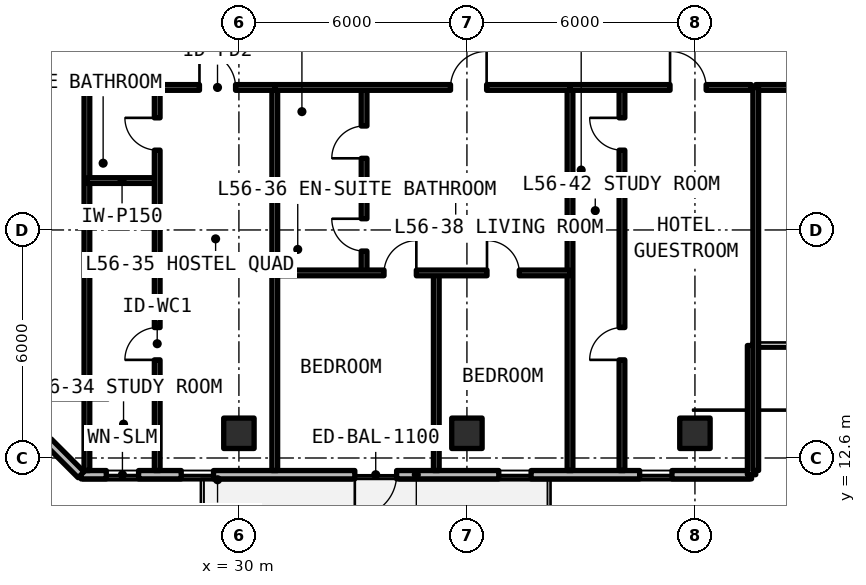
"""IFC4 building model, lengths in metres.
Left out: names, types, materials, properties, quantities, classifications, styles, units other than length and angle.
Written with IfcOpenShell. Run it as: python <this file> out.ifc"""

import sys

from ifc_helpers import new_model, si_unit, direction, frame, frame_2d, origin, origin_2d, place, context, subcontext, project, spatial, rectangle, extrude, element, fill, save


model = new_model("IFC4")
c1 = context("Model", 3, precision=1e-05, world=origin(), true_north=direction((0.0, 1.0)))
c2 = subcontext(c1, "Body", "Model", "MODEL_VIEW")
j1 = project(units=[si_unit("LENGTHUNIT", "METRE"), si_unit("PLANEANGLEUNIT", "RADIAN")], contexts=[c1])
p1 = place(None, origin())
s1 = spatial("IfcSite", under=j1, at=p1, CompositionType="ELEMENT")
p2 = place(p1, origin())
s2 = spatial("IfcBuilding", under=s1, at=p2, CompositionType="ELEMENT")
p3 = place(p2, frame((0.0, 0.0, 201.63)))
s3 = spatial("IfcBuildingStorey", under=s2, at=p3, CompositionType="ELEMENT", Elevation=201.63)
for number, where, z_axis, x_axis in (
    (1, (30.0, 13.25, 0.0), (0.0, 0.0, 1.0), (1.0, 0.0, 0.0)),
    (2, (36.0, 13.25, 0.0), (0.0, 0.0, 1.0), (1.0, 0.0, 0.0)),
    (3, (42.0, 13.25, 0.0), (0.0, 0.0, 1.0), (1.0, 0.0, 0.0)),
):
    element("IfcColumn", number, at=place(p3, frame(where, z_axis=z_axis, x_axis=x_axis)), inside=s3, PredefinedType="COLUMN", context=c2, shape_type="SweptSolid", body=[
        extrude(rectangle(XDim=0.8, YDim=0.8, at=origin_2d()), origin(), (0.0, 0.0, 1.0), 3.3),
    ])
p4 = place(p3, frame((25.846, 12.16, 0.0), z_axis=(0.0, 0.0, 1.0), x_axis=(1.0, 0.0, 0.0)))
e4 = element("IfcWall", 4, at=p4, inside=s3, PredefinedType="SOLIDWALL", context=c2, shape_type="SweptSolid", body=[
    extrude(rectangle(XDim=17.644, YDim=0.22, at=frame_2d((8.822, 0.0))), origin(), (0.0, 0.0, 1.0), 3.08),
])
p5 = place(p4, frame((7.204, 0.0, 0.0)))
e5 = element("IfcOpeningElement", 5, at=p5, cuts=e4, PredefinedType="OPENING", context=c2, shape_type="SweptSolid", body=[
    extrude(rectangle(XDim=1.1, YDim=2.15, at=frame_2d((0.55, 1.075))), frame((0.0, 0.12, 0.0), z_axis=(0.0, -1.0, 0.0), x_axis=(1.0, 0.0, 0.0)), (0.0, 0.0, 1.0), 0.24),
])
p6 = place(p4, frame((0.664, 0.0, 0.78)))
e6 = element("IfcOpeningElement", 6, at=p6, cuts=e4, PredefinedType="OPENING", context=c2, shape_type="SweptSolid", body=[
    extrude(rectangle(XDim=0.85, YDim=1.65, at=frame_2d((0.425, 0.825))), frame((0.0, 0.12, 0.0), z_axis=(0.0, -1.0, 0.0), x_axis=(1.0, 0.0, 0.0)), (0.0, 0.0, 1.0), 0.24),
])
p7 = place(p4, frame((2.636, 0.0, 0.78)))
e7 = element("IfcOpeningElement", 7, at=p7, cuts=e4, PredefinedType="OPENING", context=c2, shape_type="SweptSolid", body=[
    extrude(rectangle(XDim=0.85, YDim=1.65, at=frame_2d((0.425, 0.825))), frame((0.0, 0.12, 0.0), z_axis=(0.0, -1.0, 0.0), x_axis=(1.0, 0.0, 0.0)), (0.0, 0.0, 1.0), 0.24),
])
p8 = place(p4, frame((10.993, 0.0, 0.78)))
e8 = element("IfcOpeningElement", 8, at=p8, cuts=e4, PredefinedType="OPENING", context=c2, shape_type="SweptSolid", body=[
    extrude(rectangle(XDim=0.85, YDim=1.65, at=frame_2d((0.425, 0.825))), frame((0.0, 0.12, 0.0), z_axis=(0.0, -1.0, 0.0), x_axis=(1.0, 0.0, 0.0)), (0.0, 0.0, 1.0), 0.24),
])
p9 = place(p4, frame((14.699, 0.0, 0.78)))
e9 = element("IfcOpeningElement", 9, at=p9, cuts=e4, PredefinedType="OPENING", context=c2, shape_type="SweptSolid", body=[
    extrude(rectangle(XDim=0.85, YDim=1.65, at=frame_2d((0.425, 0.825))), frame((0.0, 0.12, 0.0), z_axis=(0.0, -1.0, 0.0), x_axis=(1.0, 0.0, 0.0)), (0.0, 0.0, 1.0), 0.24),
])
p10 = place(p3, frame((43.49, 12.16, 0.0), z_axis=(0.0, 0.0, 1.0), x_axis=(0.0, 1.0, 0.0)))
e10 = element("IfcWall", 10, at=p10, inside=s3, PredefinedType="SOLIDWALL", context=c2, shape_type="SweptSolid", body=[
    extrude(rectangle(XDim=3.4, YDim=0.22, at=frame_2d((1.7, 0.0))), origin(), (0.0, 0.0, 1.0), 3.08),
])
p11 = place(p3, frame((21.71, 16.296, 0.0), z_axis=(0.0, 0.0, 1.0), x_axis=(0.707106781187, -0.707106781187, 0.0)))
e11 = element("IfcWall", 11, at=p11, inside=s3, PredefinedType="SOLIDWALL", context=c2, shape_type="SweptSolid", body=[
    extrude(rectangle(XDim=5.849, YDim=0.22, at=frame_2d((2.924, 0.0))), origin(), (0.0, 0.0, 1.0), 3.08),
])
p12 = place(p11, frame((1.224, 0.0, 0.78)))
e12 = element("IfcOpeningElement", 12, at=p12, cuts=e11, PredefinedType="OPENING", context=c2, shape_type="SweptSolid", body=[
    extrude(rectangle(XDim=3.4, YDim=1.66, at=frame_2d((1.7, 0.83))), frame((0.0, 0.12, 0.0), z_axis=(0.0, -1.0, 0.0), x_axis=(1.0, 0.0, 0.0)), (0.0, 0.0, 1.0), 0.24),
])
p13 = place(p3, frame((43.6, 22.35, 0.0), z_axis=(0.0, 0.0, 1.0), x_axis=(1.0, 0.0, 0.0)))
e13 = element("IfcWall", 13, at=p13, inside=s3, PredefinedType="SOLIDWALL", context=c2, shape_type="SweptSolid", body=[
    extrude(rectangle(XDim=8.4, YDim=0.15, at=frame_2d((4.2, 0.0))), origin(), (0.0, 0.0, 1.0), 2.35),
])
p14 = place(p13, frame((3.65, 0.0, 0.0)))
e14 = element("IfcOpeningElement", 14, at=p14, cuts=e13, PredefinedType="OPENING", context=c2, shape_type="SweptSolid", body=[
    extrude(rectangle(XDim=1.1, YDim=2.15, at=frame_2d((0.55, 1.075))), frame((0.0, 0.085, 0.0), z_axis=(0.0, -1.0, 0.0), x_axis=(1.0, 0.0, 0.0)), (0.0, 0.0, 1.0), 0.17),
])
for number, where, z_axis, x_axis in (
    (15, (43.6, 12.27, 0.0), (0.0, 0.0, 1.0), (0.0, 1.0, 0.0)),
    (16, (26.0, 12.27, 0.0), (0.0, 0.0, 1.0), (0.0, 1.0, 0.0)),
    (17, (30.944, 12.27, 0.0), (0.0, 0.0, 1.0), (0.0, 1.0, 0.0)),
):
    element("IfcWall", number, at=place(p3, frame(where, z_axis=z_axis, x_axis=x_axis)), inside=s3, PredefinedType="SOLIDWALL", context=c2, shape_type="SweptSolid", body=[
        extrude(rectangle(XDim=10.08, YDim=0.15, at=frame_2d((5.04, 0.0))), origin(), (0.0, 0.0, 1.0), 2.35),
    ])
p15 = place(p3, frame((26.0, 19.9, 0.0), z_axis=(0.0, 0.0, 1.0), x_axis=(1.0, 0.0, 0.0)))
e18 = element("IfcWall", 18, at=p15, inside=s3, PredefinedType="PARTITIONING", context=c2, shape_type="SweptSolid", body=[
    extrude(rectangle(XDim=1.85, YDim=0.15, at=frame_2d((0.925, 0.0))), origin(), (0.0, 0.0, 1.0), 2.35),
])
p16 = place(p3, frame((27.85, 12.27, 0.0), z_axis=(0.0, 0.0, 1.0), x_axis=(0.0, 1.0, 0.0)))
e19 = element("IfcWall", 19, at=p16, inside=s3, PredefinedType="PARTITIONING", context=c2, shape_type="SweptSolid", body=[
    extrude(rectangle(XDim=10.08, YDim=0.15, at=frame_2d((5.04, 0.0))), origin(), (0.0, 0.0, 1.0), 2.35),
])
p17 = place(p16, frame((2.912, 0.0, 0.0)))
e20 = element("IfcOpeningElement", 20, at=p17, cuts=e19, PredefinedType="OPENING", context=c2, shape_type="SweptSolid", body=[
    extrude(rectangle(XDim=0.85, YDim=2.1, at=frame_2d((0.425, 1.05))), frame((0.0, 0.085, 0.0), z_axis=(0.0, -1.0, 0.0), x_axis=(1.0, 0.0, 0.0)), (0.0, 0.0, 1.0), 0.17),
])
p18 = place(p16, frame((8.43, 0.0, 0.0)))
e21 = element("IfcOpeningElement", 21, at=p18, cuts=e19, PredefinedType="OPENING", context=c2, shape_type="SweptSolid", body=[
    extrude(rectangle(XDim=0.85, YDim=2.1, at=frame_2d((0.425, 1.05))), frame((0.0, 0.085, 0.0), z_axis=(0.0, -1.0, 0.0), x_axis=(1.0, 0.0, 0.0)), (0.0, 0.0, 1.0), 0.17),
])
p19 = place(p3, frame((26.0, 22.35, 0.0), z_axis=(0.0, 0.0, 1.0), x_axis=(1.0, 0.0, 0.0)))
e22 = element("IfcWall", 22, at=p19, inside=s3, PredefinedType="SOLIDWALL", context=c2, shape_type="SweptSolid", body=[
    extrude(rectangle(XDim=4.944, YDim=0.15, at=frame_2d((2.472, 0.0))), origin(), (0.0, 0.0, 1.0), 2.35),
])
p20 = place(p19, frame((2.962, 0.0, 0.0)))
e23 = element("IfcOpeningElement", 23, at=p20, cuts=e22, PredefinedType="OPENING", context=c2, shape_type="SweptSolid", body=[
    extrude(rectangle(XDim=0.95, YDim=2.15, at=frame_2d((0.475, 1.075))), frame((0.0, 0.085, 0.0), z_axis=(0.0, -1.0, 0.0), x_axis=(1.0, 0.0, 0.0)), (0.0, 0.0, 1.0), 0.17),
])
p21 = place(p3, frame((38.713, 12.27, 0.0), z_axis=(0.0, 0.0, 1.0), x_axis=(0.0, 1.0, 0.0)))
e24 = element("IfcWall", 24, at=p21, inside=s3, PredefinedType="SOLIDWALL", context=c2, shape_type="SweptSolid", body=[
    extrude(rectangle(XDim=10.08, YDim=0.15, at=frame_2d((5.04, 0.0))), origin(), (0.0, 0.0, 1.0), 2.35),
])
p22 = place(p3, frame((30.944, 19.471, 0.0), z_axis=(0.0, 0.0, 1.0), x_axis=(1.0, 0.0, 0.0)))
e25 = element("IfcWall", 25, at=p22, inside=s3, PredefinedType="PARTITIONING", context=c2, shape_type="SweptSolid", body=[
    extrude(rectangle(XDim=2.35, YDim=0.15, at=frame_2d((1.175, 0.0))), origin(), (0.0, 0.0, 1.0), 2.35),
])
p23 = place(p3, frame((33.294, 17.47, 0.0), z_axis=(0.0, 0.0, 1.0), x_axis=(0.0, 1.0, 0.0)))
e26 = element("IfcWall", 26, at=p23, inside=s3, PredefinedType="PARTITIONING", context=c2, shape_type="SweptSolid", body=[
    extrude(rectangle(XDim=4.88, YDim=0.15, at=frame_2d((2.44, 0.0))), origin(), (0.0, 0.0, 1.0), 2.35),
])
p24 = place(p23, frame((0.575, 0.0, 0.0)))
e27 = element("IfcOpeningElement", 27, at=p24, cuts=e26, PredefinedType="OPENING", context=c2, shape_type="SweptSolid", body=[
    extrude(rectangle(XDim=0.85, YDim=2.1, at=frame_2d((0.425, 1.05))), frame((0.0, 0.085, 0.0), z_axis=(0.0, -1.0, 0.0), x_axis=(1.0, 0.0, 0.0)), (0.0, 0.0, 1.0), 0.17),
])
p25 = place(p23, frame((3.015, 0.0, 0.0)))
e28 = element("IfcOpeningElement", 28, at=p25, cuts=e26, PredefinedType="OPENING", context=c2, shape_type="SweptSolid", body=[
    extrude(rectangle(XDim=0.85, YDim=2.1, at=frame_2d((0.425, 1.05))), frame((0.0, 0.085, 0.0), z_axis=(0.0, -1.0, 0.0), x_axis=(1.0, 0.0, 0.0)), (0.0, 0.0, 1.0), 0.17),
])
p26 = place(p3, frame((35.194, 12.27, 0.0), z_axis=(0.0, 0.0, 1.0), x_axis=(0.0, 1.0, 0.0)))
e29 = element("IfcWall", 29, at=p26, inside=s3, PredefinedType="PARTITIONING", context=c2, shape_type="SweptSolid", body=[
    extrude(rectangle(XDim=5.2, YDim=0.15, at=frame_2d((2.6, 0.0))), origin(), (0.0, 0.0, 1.0), 2.35),
])
p27 = place(p3, frame((30.944, 17.47, 0.0), z_axis=(0.0, 0.0, 1.0), x_axis=(1.0, 0.0, 0.0)))
e30 = element("IfcWall", 30, at=p27, inside=s3, PredefinedType="PARTITIONING", context=c2, shape_type="SweptSolid", body=[
    extrude(rectangle(XDim=7.769, YDim=0.15, at=frame_2d((3.884, 0.0))), origin(), (0.0, 0.0, 1.0), 2.35),
])
p28 = place(p27, frame((2.875, 0.0, 0.0)))
e31 = element("IfcOpeningElement", 31, at=p28, cuts=e30, PredefinedType="OPENING", context=c2, shape_type="SweptSolid", body=[
    extrude(rectangle(XDim=0.85, YDim=2.1, at=frame_2d((0.425, 1.05))), frame((0.0, 0.085, 0.0), z_axis=(0.0, -1.0, 0.0), x_axis=(1.0, 0.0, 0.0)), (0.0, 0.0, 1.0), 0.17),
])
p29 = place(p27, frame((5.584, 0.0, 0.0)))
e32 = element("IfcOpeningElement", 32, at=p29, cuts=e30, PredefinedType="OPENING", context=c2, shape_type="SweptSolid", body=[
    extrude(rectangle(XDim=0.85, YDim=2.1, at=frame_2d((0.425, 1.05))), frame((0.0, 0.085, 0.0), z_axis=(0.0, -1.0, 0.0), x_axis=(1.0, 0.0, 0.0)), (0.0, 0.0, 1.0), 0.17),
])
p30 = place(p3, frame((30.944, 22.35, 0.0), z_axis=(0.0, 0.0, 1.0), x_axis=(1.0, 0.0, 0.0)))
e33 = element("IfcWall", 33, at=p30, inside=s3, PredefinedType="SOLIDWALL", context=c2, shape_type="SweptSolid", body=[
    extrude(rectangle(XDim=7.769, YDim=0.15, at=frame_2d((3.884, 0.0))), origin(), (0.0, 0.0, 1.0), 2.35),
])
p31 = place(p30, frame((4.625, 0.0, 0.0)))
e34 = element("IfcOpeningElement", 34, at=p31, cuts=e33, PredefinedType="OPENING", context=c2, shape_type="SweptSolid", body=[
    extrude(rectangle(XDim=0.95, YDim=2.15, at=frame_2d((0.475, 1.075))), frame((0.0, 0.085, 0.0), z_axis=(0.0, -1.0, 0.0), x_axis=(1.0, 0.0, 0.0)), (0.0, 0.0, 1.0), 0.17),
])
p32 = place(p3, frame((38.713, 19.9, 0.0), z_axis=(0.0, 0.0, 1.0), x_axis=(1.0, 0.0, 0.0)))
e35 = element("IfcWall", 35, at=p32, inside=s3, PredefinedType="PARTITIONING", context=c2, shape_type="SweptSolid", body=[
    extrude(rectangle(XDim=1.367, YDim=0.15, at=frame_2d((0.684, 0.0))), origin(), (0.0, 0.0, 1.0), 2.35),
])
p33 = place(p3, frame((40.08, 12.27, 0.0), z_axis=(0.0, 0.0, 1.0), x_axis=(0.0, 1.0, 0.0)))
e36 = element("IfcWall", 36, at=p33, inside=s3, PredefinedType="PARTITIONING", context=c2, shape_type="SweptSolid", body=[
    extrude(rectangle(XDim=10.08, YDim=0.15, at=frame_2d((5.04, 0.0))), origin(), (0.0, 0.0, 1.0), 2.35),
])
p34 = place(p33, frame((2.912, 0.0, 0.0)))
e37 = element("IfcOpeningElement", 37, at=p34, cuts=e36, PredefinedType="OPENING", context=c2, shape_type="SweptSolid", body=[
    extrude(rectangle(XDim=0.85, YDim=2.1, at=frame_2d((0.425, 1.05))), frame((0.0, 0.085, 0.0), z_axis=(0.0, -1.0, 0.0), x_axis=(1.0, 0.0, 0.0)), (0.0, 0.0, 1.0), 0.17),
])
p35 = place(p33, frame((8.43, 0.0, 0.0)))
e38 = element("IfcOpeningElement", 38, at=p35, cuts=e36, PredefinedType="OPENING", context=c2, shape_type="SweptSolid", body=[
    extrude(rectangle(XDim=0.85, YDim=2.1, at=frame_2d((0.425, 1.05))), frame((0.0, 0.085, 0.0), z_axis=(0.0, -1.0, 0.0), x_axis=(1.0, 0.0, 0.0)), (0.0, 0.0, 1.0), 0.17),
])
p36 = place(p3, frame((38.713, 22.35, 0.0), z_axis=(0.0, 0.0, 1.0), x_axis=(1.0, 0.0, 0.0)))
e39 = element("IfcWall", 39, at=p36, inside=s3, PredefinedType="SOLIDWALL", context=c2, shape_type="SweptSolid", body=[
    extrude(rectangle(XDim=4.767, YDim=0.15, at=frame_2d((2.384, 0.0))), origin(), (0.0, 0.0, 1.0), 2.35),
])
p37 = place(p36, frame((2.632, 0.0, 0.0)))
e40 = element("IfcOpeningElement", 40, at=p37, cuts=e39, PredefinedType="OPENING", context=c2, shape_type="SweptSolid", body=[
    extrude(rectangle(XDim=0.95, YDim=2.15, at=frame_2d((0.475, 1.075))), frame((0.0, 0.085, 0.0), z_axis=(0.0, -1.0, 0.0), x_axis=(1.0, 0.0, 0.0)), (0.0, 0.0, 1.0), 0.17),
])
p38 = place(p5, frame((1.1, 0.0, 0.0), z_axis=(0.0, 0.0, 1.0), x_axis=(-1.0, 0.0, 0.0)))
e41 = element("IfcDoor", 41, at=p38, inside=s3, OperationType="SINGLE_SWING_LEFT", PredefinedType="DOOR", context=c2, shape_type="SweptSolid", body=[
    extrude(rectangle(XDim=1.1, YDim=2.15, at=frame_2d((0.55, 1.075))), frame((0.0, 0.025, 0.0), z_axis=(0.0, -1.0, 0.0), x_axis=(1.0, 0.0, 0.0)), (0.0, 0.0, 1.0), 0.05),
])
fill(e5, e41)
p39 = place(p6, origin())
e42 = element("IfcWindow", 42, at=p39, inside=s3, PartitioningType="SINGLE_PANEL", PredefinedType="WINDOW", context=c2, shape_type="SweptSolid", body=[
    extrude(rectangle(XDim=0.85, YDim=1.65, at=frame_2d((0.425, 0.825))), frame((0.0, 0.03, 0.0), z_axis=(0.0, -1.0, 0.0), x_axis=(1.0, 0.0, 0.0)), (0.0, 0.0, 1.0), 0.06),
])
fill(e6, e42)
p40 = place(p7, origin())
e43 = element("IfcWindow", 43, at=p40, inside=s3, PartitioningType="SINGLE_PANEL", PredefinedType="WINDOW", context=c2, shape_type="SweptSolid", body=[
    extrude(rectangle(XDim=0.85, YDim=1.65, at=frame_2d((0.425, 0.825))), frame((0.0, 0.03, 0.0), z_axis=(0.0, -1.0, 0.0), x_axis=(1.0, 0.0, 0.0)), (0.0, 0.0, 1.0), 0.06),
])
fill(e7, e43)
p41 = place(p8, origin())
e44 = element("IfcWindow", 44, at=p41, inside=s3, PartitioningType="SINGLE_PANEL", PredefinedType="WINDOW", context=c2, shape_type="SweptSolid", body=[
    extrude(rectangle(XDim=0.85, YDim=1.65, at=frame_2d((0.425, 0.825))), frame((0.0, 0.03, 0.0), z_axis=(0.0, -1.0, 0.0), x_axis=(1.0, 0.0, 0.0)), (0.0, 0.0, 1.0), 0.06),
])
fill(e8, e44)
p42 = place(p9, origin())
e45 = element("IfcWindow", 45, at=p42, inside=s3, PartitioningType="SINGLE_PANEL", PredefinedType="WINDOW", context=c2, shape_type="SweptSolid", body=[
    extrude(rectangle(XDim=0.85, YDim=1.65, at=frame_2d((0.425, 0.825))), frame((0.0, 0.03, 0.0), z_axis=(0.0, -1.0, 0.0), x_axis=(1.0, 0.0, 0.0)), (0.0, 0.0, 1.0), 0.06),
])
fill(e9, e45)
p43 = place(p17, origin())
e46 = element("IfcDoor", 46, at=p43, inside=s3, OperationType="SINGLE_SWING_LEFT", PredefinedType="DOOR", context=c2, shape_type="SweptSolid", body=[
    extrude(rectangle(XDim=0.85, YDim=2.1, at=frame_2d((0.425, 1.05))), frame((0.0, 0.025, 0.0), z_axis=(0.0, -1.0, 0.0), x_axis=(1.0, 0.0, 0.0)), (0.0, 0.0, 1.0), 0.05),
])
fill(e20, e46)
p44 = place(p18, origin())
e47 = element("IfcDoor", 47, at=p44, inside=s3, OperationType="SINGLE_SWING_RIGHT", PredefinedType="DOOR", context=c2, shape_type="SweptSolid", body=[
    extrude(rectangle(XDim=0.85, YDim=2.1, at=frame_2d((0.425, 1.05))), frame((0.0, 0.025, 0.0), z_axis=(0.0, -1.0, 0.0), x_axis=(1.0, 0.0, 0.0)), (0.0, 0.0, 1.0), 0.05),
])
fill(e21, e47)
p45 = place(p20, origin())
e48 = element("IfcDoor", 48, at=p45, inside=s3, OperationType="SINGLE_SWING_LEFT", PredefinedType="DOOR", context=c2, shape_type="SweptSolid", body=[
    extrude(rectangle(XDim=0.95, YDim=2.15, at=frame_2d((0.475, 1.075))), frame((0.0, 0.025, 0.0), z_axis=(0.0, -1.0, 0.0), x_axis=(1.0, 0.0, 0.0)), (0.0, 0.0, 1.0), 0.05),
])
fill(e23, e48)
p46 = place(p24, origin())
e49 = element("IfcDoor", 49, at=p46, inside=s3, OperationType="SINGLE_SWING_RIGHT", PredefinedType="DOOR", context=c2, shape_type="SweptSolid", body=[
    extrude(rectangle(XDim=0.85, YDim=2.1, at=frame_2d((0.425, 1.05))), frame((0.0, 0.025, 0.0), z_axis=(0.0, -1.0, 0.0), x_axis=(1.0, 0.0, 0.0)), (0.0, 0.0, 1.0), 0.05),
])
fill(e27, e49)
p47 = place(p25, origin())
e50 = element("IfcDoor", 50, at=p47, inside=s3, OperationType="SINGLE_SWING_LEFT", PredefinedType="DOOR", context=c2, shape_type="SweptSolid", body=[
    extrude(rectangle(XDim=0.85, YDim=2.1, at=frame_2d((0.425, 1.05))), frame((0.0, 0.025, 0.0), z_axis=(0.0, -1.0, 0.0), x_axis=(1.0, 0.0, 0.0)), (0.0, 0.0, 1.0), 0.05),
])
fill(e28, e50)
p48 = place(p28, origin())
e51 = element("IfcDoor", 51, at=p48, inside=s3, OperationType="SINGLE_SWING_RIGHT", PredefinedType="DOOR", context=c2, shape_type="SweptSolid", body=[
    extrude(rectangle(XDim=0.85, YDim=2.1, at=frame_2d((0.425, 1.05))), frame((0.0, 0.025, 0.0), z_axis=(0.0, -1.0, 0.0), x_axis=(1.0, 0.0, 0.0)), (0.0, 0.0, 1.0), 0.05),
])
fill(e31, e51)
p49 = place(p29, origin())
e52 = element("IfcDoor", 52, at=p49, inside=s3, OperationType="SINGLE_SWING_LEFT", PredefinedType="DOOR", context=c2, shape_type="SweptSolid", body=[
    extrude(rectangle(XDim=0.85, YDim=2.1, at=frame_2d((0.425, 1.05))), frame((0.0, 0.025, 0.0), z_axis=(0.0, -1.0, 0.0), x_axis=(1.0, 0.0, 0.0)), (0.0, 0.0, 1.0), 0.05),
])
fill(e32, e52)
p50 = place(p31, origin())
e53 = element("IfcDoor", 53, at=p50, inside=s3, OperationType="SINGLE_SWING_RIGHT", PredefinedType="DOOR", context=c2, shape_type="SweptSolid", body=[
    extrude(rectangle(XDim=0.95, YDim=2.15, at=frame_2d((0.475, 1.075))), frame((0.0, 0.025, 0.0), z_axis=(0.0, -1.0, 0.0), x_axis=(1.0, 0.0, 0.0)), (0.0, 0.0, 1.0), 0.05),
])
fill(e34, e53)
p51 = place(p34, origin())
e54 = element("IfcDoor", 54, at=p51, inside=s3, OperationType="SINGLE_SWING_LEFT", PredefinedType="DOOR", context=c2, shape_type="SweptSolid", body=[
    extrude(rectangle(XDim=0.85, YDim=2.1, at=frame_2d((0.425, 1.05))), frame((0.0, 0.025, 0.0), z_axis=(0.0, -1.0, 0.0), x_axis=(1.0, 0.0, 0.0)), (0.0, 0.0, 1.0), 0.05),
])
fill(e37, e54)
p52 = place(p35, origin())
e55 = element("IfcDoor", 55, at=p52, inside=s3, OperationType="SINGLE_SWING_RIGHT", PredefinedType="DOOR", context=c2, shape_type="SweptSolid", body=[
    extrude(rectangle(XDim=0.85, YDim=2.1, at=frame_2d((0.425, 1.05))), frame((0.0, 0.025, 0.0), z_axis=(0.0, -1.0, 0.0), x_axis=(1.0, 0.0, 0.0)), (0.0, 0.0, 1.0), 0.05),
])
fill(e38, e55)
p53 = place(p37, origin())
e56 = element("IfcDoor", 56, at=p53, inside=s3, OperationType="SINGLE_SWING_LEFT", PredefinedType="DOOR", context=c2, shape_type="SweptSolid", body=[
    extrude(rectangle(XDim=0.95, YDim=2.15, at=frame_2d((0.475, 1.075))), frame((0.0, 0.025, 0.0), z_axis=(0.0, -1.0, 0.0), x_axis=(1.0, 0.0, 0.0)), (0.0, 0.0, 1.0), 0.05),
])
fill(e40, e56)
save(model, sys.argv[1])
